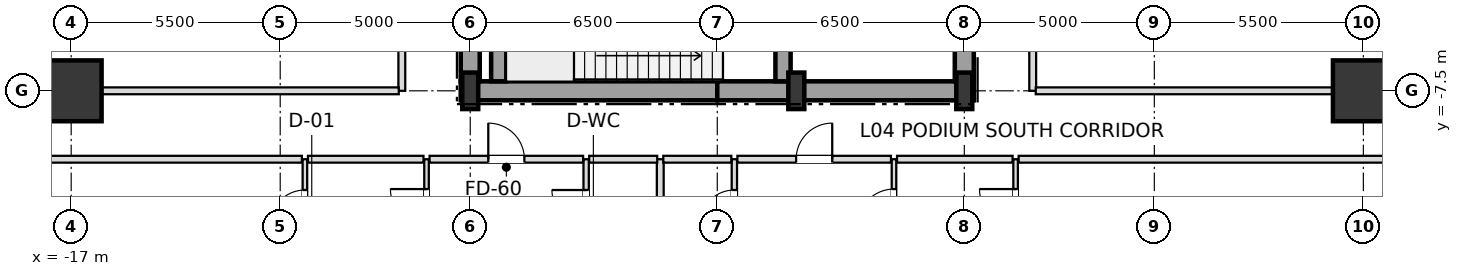
"""IFC4 building model, lengths in metres.
Left out: names, types, materials, properties, quantities, classifications, styles, units other than length and angle.
Written with IfcOpenShell. Run it as: python <this file> out.ifc"""

import sys

from ifc_helpers import new_model, si_unit, direction, frame, frame_2d, origin, origin_2d, place, context, subcontext, project, spatial, rectangle, i_section, extrude, element, fill, save


model = new_model("IFC4")
c1 = context("Model", 3, precision=1e-05, world=origin(), true_north=direction((0.0, 1.0)))
c2 = subcontext(c1, "Body", "Model", "MODEL_VIEW")
j1 = project(units=[si_unit("LENGTHUNIT", "METRE"), si_unit("PLANEANGLEUNIT", "RADIAN")], contexts=[c1])
p1 = place(None, origin())
s1 = spatial("IfcSite", under=j1, at=p1, CompositionType="ELEMENT")
p2 = place(p1, origin())
s2 = spatial("IfcBuilding", under=s1, at=p2, CompositionType="ELEMENT")
p3 = place(p2, frame((0.0, 0.0, 22.2)))
s3 = spatial("IfcBuildingStorey", under=s2, at=p3, CompositionType="ELEMENT", Elevation=22.2)
for number, where, z_axis, x_axis in (
    (1, (-6.5, -7.5, 0.0), (0.0, 0.0, 1.0), (1.0, 0.0, 0.0)),
    (2, (2.08, -7.5, 0.0), (0.0, 0.0, 1.0), (1.0, 0.0, 0.0)),
    (3, (6.5, -7.5, 0.0), (0.0, 0.0, 1.0), (1.0, 0.0, 0.0)),
):
    element("IfcColumn", number, at=place(p3, frame(where, z_axis=z_axis, x_axis=x_axis)), inside=s3, PredefinedType="COLUMN", context=c2, shape_type="SweptSolid", body=[
        extrude(i_section(OverallWidth=0.42, OverallDepth=0.96, WebThickness=0.022, FlangeThickness=0.034, at=origin_2d()), origin(), (0.0, 0.0, 1.0), 5.4),
    ])
for number, where, z_axis, x_axis in (
    (4, (17.0, -7.5, 0.0), (0.0, 0.0, 1.0), (1.0, 0.0, 0.0)),
    (5, (-17.0, -7.5, 0.0), (0.0, 0.0, 1.0), (1.0, 0.0, 0.0)),
):
    element("IfcColumn", number, at=place(p3, frame(where, z_axis=z_axis, x_axis=x_axis)), inside=s3, PredefinedType="USERDEFINED", context=c2, shape_type="SweptSolid", body=[
        extrude(rectangle(XDim=1.6, YDim=1.6, at=origin_2d()), origin(), (0.0, 0.0, 1.0), 5.4),
    ])
for number, where, z_axis, x_axis in (
    (6, (-6.75, -7.5, 0.0), (0.0, 0.0, 1.0), (1.0, 0.0, 0.0)),
    (7, (0.0, -7.5, 0.0), (0.0, 0.0, 1.0), (1.0, 0.0, 0.0)),
):
    element("IfcWall", number, at=place(p3, frame(where, z_axis=z_axis, x_axis=x_axis)), inside=s3, PredefinedType="SHEAR", context=c2, shape_type="SweptSolid", body=[
        extrude(rectangle(XDim=6.75, YDim=0.5, at=frame_2d((3.375, 0.0))), origin(), (0.0, 0.0, 1.0), 5.0),
    ])
p4 = place(p3, frame((-6.5, -7.25, 0.0), z_axis=(0.0, 0.0, 1.0), x_axis=(0.0, 1.0, 0.0)))
e8 = element("IfcWall", 8, at=p4, inside=s3, PredefinedType="SHEAR", context=c2, shape_type="SweptSolid", body=[
    extrude(rectangle(XDim=3.55, YDim=0.5, at=frame_2d((1.775, 0.0))), origin(), (0.0, 0.0, 1.0), 5.0),
])
p5 = place(p3, frame((6.5, -7.25, 0.0), z_axis=(0.0, 0.0, 1.0), x_axis=(0.0, 1.0, 0.0)))
e9 = element("IfcWall", 9, at=p5, inside=s3, PredefinedType="SHEAR", context=c2, shape_type="SweptSolid", body=[
    extrude(rectangle(XDim=5.75, YDim=0.5, at=frame_2d((2.875, 0.0))), origin(), (0.0, 0.0, 1.0), 5.0),
])
p6 = place(p5, frame((0.85, 0.0, 0.0)))
e10 = element("IfcOpeningElement", 10, at=p6, cuts=e9, PredefinedType="OPENING", context=c2, shape_type="SweptSolid", body=[
    extrude(rectangle(XDim=1.05, YDim=2.15, at=frame_2d((0.525, 1.075))), frame((0.0, 0.26, 0.0), z_axis=(0.0, -1.0, 0.0), x_axis=(1.0, 0.0, 0.0)), (0.0, 0.0, 1.0), 0.52),
])
p7 = place(p3, frame((-5.75, -7.25, 0.0), z_axis=(0.0, 0.0, 1.0), x_axis=(0.0, 1.0, 0.0)))
e11 = element("IfcWall", 11, at=p7, inside=s3, PredefinedType="SHEAR", context=c2, shape_type="SweptSolid", body=[
    extrude(rectangle(XDim=2.9, YDim=0.4, at=frame_2d((1.45, 0.0))), origin(), (0.0, 0.0, 1.0), 5.0),
])
p8 = place(p3, frame((1.73, -7.25, 0.0), z_axis=(0.0, 0.0, 1.0), x_axis=(0.0, 1.0, 0.0)))
e12 = element("IfcWall", 12, at=p8, inside=s3, PredefinedType="SHEAR", context=c2, shape_type="SweptSolid", body=[
    extrude(rectangle(XDim=3.3, YDim=0.4, at=frame_2d((1.65, 0.0))), origin(), (0.0, 0.0, 1.0), 5.0),
])
p9 = place(p8, frame((0.9, 0.0, 0.0)))
e13 = element("IfcOpeningElement", 13, at=p9, cuts=e12, PredefinedType="OPENING", context=c2, shape_type="SweptSolid", body=[
    extrude(rectangle(XDim=1.05, YDim=2.15, at=frame_2d((0.525, 1.075))), frame((0.0, 0.21, 0.0), z_axis=(0.0, -1.0, 0.0), x_axis=(1.0, 0.0, 0.0)), (0.0, 0.0, 1.0), 0.42),
])
p10 = place(p3, frame((-10.85, -16.695, 0.0), z_axis=(0.0, 0.0, 1.0), x_axis=(0.0, 1.0, 0.0)))
e14 = element("IfcWall", 14, at=p10, inside=s3, PredefinedType="PARTITIONING", context=c2, shape_type="SweptSolid", body=[
    extrude(rectangle(XDim=7.395, YDim=0.12, at=frame_2d((3.698, 0.0))), origin(), (0.0, 0.0, 1.0), 4.436),
])
p11 = place(p10, frame((5.685, 0.0, 0.0)))
e15 = element("IfcOpeningElement", 15, at=p11, cuts=e14, PredefinedType="OPENING", context=c2, shape_type="SweptSolid", body=[
    extrude(rectangle(XDim=0.9, YDim=2.1, at=frame_2d((0.45, 1.05))), frame((0.0, 0.07, 0.0), z_axis=(0.0, -1.0, 0.0), x_axis=(1.0, 0.0, 0.0)), (0.0, 0.0, 1.0), 0.14),
])
p12 = place(p10, frame((1.985, 0.0, 0.0)))
e16 = element("IfcOpeningElement", 16, at=p12, cuts=e14, PredefinedType="OPENING", context=c2, shape_type="SweptSolid", body=[
    extrude(rectangle(XDim=0.9, YDim=2.1, at=frame_2d((0.45, 1.05))), frame((0.0, 0.07, 0.0), z_axis=(0.0, -1.0, 0.0), x_axis=(1.0, 0.0, 0.0)), (0.0, 0.0, 1.0), 0.14),
])
p13 = place(p3, frame((-8.3, -7.5, 0.0), z_axis=(0.0, 0.0, 1.0), x_axis=(0.0, 1.0, 0.0)))
e17 = element("IfcWall", 17, at=p13, inside=s3, PredefinedType="PARTITIONING", context=c2, shape_type="SweptSolid", body=[
    extrude(rectangle(XDim=15.0, YDim=0.18, at=frame_2d((7.5, 0.0))), origin(), (0.0, 0.0, 1.0), 5.0),
])
p14 = place(p13, frame((7.025, 0.0, 0.0)))
e18 = element("IfcOpeningElement", 18, at=p14, cuts=e17, PredefinedType="OPENING", context=c2, shape_type="SweptSolid", body=[
    extrude(rectangle(XDim=0.95, YDim=2.15, at=frame_2d((0.475, 1.075))), frame((0.0, 0.1, 0.0), z_axis=(0.0, -1.0, 0.0), x_axis=(1.0, 0.0, 0.0)), (0.0, 0.0, 1.0), 0.2),
])
p15 = place(p3, frame((-7.65, -11.82, 0.0), z_axis=(0.0, 0.0, 1.0), x_axis=(0.0, 1.0, 0.0)))
e19 = element("IfcWall", 19, at=p15, inside=s3, PredefinedType="PARTITIONING", context=c2, shape_type="SweptSolid", body=[
    extrude(rectangle(XDim=2.52, YDim=0.12, at=frame_2d((1.26, 0.0))), origin(), (0.0, 0.0, 1.0), 5.0),
])
p16 = place(p15, frame((0.785, 0.0, 0.0)))
e20 = element("IfcOpeningElement", 20, at=p16, cuts=e19, PredefinedType="OPENING", context=c2, shape_type="SweptSolid", body=[
    extrude(rectangle(XDim=0.95, YDim=2.1, at=frame_2d((0.475, 1.05))), frame((0.0, 0.07, 0.0), z_axis=(0.0, -1.0, 0.0), x_axis=(1.0, 0.0, 0.0)), (0.0, 0.0, 1.0), 0.14),
])
p17 = place(p3, frame((-3.45, -11.82, 0.0), z_axis=(0.0, 0.0, 1.0), x_axis=(0.0, 1.0, 0.0)))
e21 = element("IfcWall", 21, at=p17, inside=s3, PredefinedType="PARTITIONING", context=c2, shape_type="SweptSolid", body=[
    extrude(rectangle(XDim=2.52, YDim=0.14, at=frame_2d((1.26, 0.0))), origin(), (0.0, 0.0, 1.0), 5.0),
])
p18 = place(p17, frame((0.81, 0.0, 0.0)))
e22 = element("IfcOpeningElement", 22, at=p18, cuts=e21, PredefinedType="OPENING", context=c2, shape_type="SweptSolid", body=[
    extrude(rectangle(XDim=0.9, YDim=2.1, at=frame_2d((0.45, 1.05))), frame((0.0, 0.08, 0.0), z_axis=(0.0, -1.0, 0.0), x_axis=(1.0, 0.0, 0.0)), (0.0, 0.0, 1.0), 0.16),
])
p19 = place(p3, frame((-1.5, -16.755, 0.0), z_axis=(0.0, 0.0, 1.0), x_axis=(0.0, 1.0, 0.0)))
e23 = element("IfcWall", 23, at=p19, inside=s3, PredefinedType="PARTITIONING", context=c2, shape_type="SweptSolid", body=[
    extrude(rectangle(XDim=7.455, YDim=0.18, at=frame_2d((3.728, 0.0))), origin(), (0.0, 0.0, 1.0), 4.568),
])
p20 = place(p3, frame((0.45, -11.82, 0.0), z_axis=(0.0, 0.0, 1.0), x_axis=(0.0, 1.0, 0.0)))
e24 = element("IfcWall", 24, at=p20, inside=s3, PredefinedType="PARTITIONING", context=c2, shape_type="SweptSolid", body=[
    extrude(rectangle(XDim=2.52, YDim=0.14, at=frame_2d((1.26, 0.0))), origin(), (0.0, 0.0, 1.0), 5.0),
])
p21 = place(p20, frame((0.81, 0.0, 0.0)))
e25 = element("IfcOpeningElement", 25, at=p21, cuts=e24, PredefinedType="OPENING", context=c2, shape_type="SweptSolid", body=[
    extrude(rectangle(XDim=0.9, YDim=2.1, at=frame_2d((0.45, 1.05))), frame((0.0, 0.08, 0.0), z_axis=(0.0, -1.0, 0.0), x_axis=(1.0, 0.0, 0.0)), (0.0, 0.0, 1.0), 0.16),
])
p22 = place(p3, frame((4.65, -11.82, 0.0), z_axis=(0.0, 0.0, 1.0), x_axis=(0.0, 1.0, 0.0)))
e26 = element("IfcWall", 26, at=p22, inside=s3, PredefinedType="PARTITIONING", context=c2, shape_type="SweptSolid", body=[
    extrude(rectangle(XDim=2.52, YDim=0.12, at=frame_2d((1.26, 0.0))), origin(), (0.0, 0.0, 1.0), 5.0),
])
p23 = place(p22, frame((0.785, 0.0, 0.0)))
e27 = element("IfcOpeningElement", 27, at=p23, cuts=e26, PredefinedType="OPENING", context=c2, shape_type="SweptSolid", body=[
    extrude(rectangle(XDim=0.95, YDim=2.1, at=frame_2d((0.475, 1.05))), frame((0.0, 0.07, 0.0), z_axis=(0.0, -1.0, 0.0), x_axis=(1.0, 0.0, 0.0)), (0.0, 0.0, 1.0), 0.14),
])
p24 = place(p3, frame((7.85, -16.695, 0.0), z_axis=(0.0, 0.0, 1.0), x_axis=(0.0, 1.0, 0.0)))
e28 = element("IfcWall", 28, at=p24, inside=s3, PredefinedType="PARTITIONING", context=c2, shape_type="SweptSolid", body=[
    extrude(rectangle(XDim=7.395, YDim=0.12, at=frame_2d((3.698, 0.0))), origin(), (0.0, 0.0, 1.0), 4.436),
])
p25 = place(p24, frame((5.66, 0.0, 0.0)))
e29 = element("IfcOpeningElement", 29, at=p25, cuts=e28, PredefinedType="OPENING", context=c2, shape_type="SweptSolid", body=[
    extrude(rectangle(XDim=0.95, YDim=2.1, at=frame_2d((0.475, 1.05))), frame((0.0, 0.07, 0.0), z_axis=(0.0, -1.0, 0.0), x_axis=(1.0, 0.0, 0.0)), (0.0, 0.0, 1.0), 0.14),
])
p26 = place(p24, frame((1.985, 0.0, 0.0)))
e30 = element("IfcOpeningElement", 30, at=p26, cuts=e28, PredefinedType="OPENING", context=c2, shape_type="SweptSolid", body=[
    extrude(rectangle(XDim=0.9, YDim=2.1, at=frame_2d((0.45, 1.05))), frame((0.0, 0.07, 0.0), z_axis=(0.0, -1.0, 0.0), x_axis=(1.0, 0.0, 0.0)), (0.0, 0.0, 1.0), 0.14),
])
p27 = place(p3, frame((8.3, -7.5, 0.0), z_axis=(0.0, 0.0, 1.0), x_axis=(0.0, 1.0, 0.0)))
e31 = element("IfcWall", 31, at=p27, inside=s3, PredefinedType="PARTITIONING", context=c2, shape_type="SweptSolid", body=[
    extrude(rectangle(XDim=15.0, YDim=0.18, at=frame_2d((7.5, 0.0))), origin(), (0.0, 0.0, 1.0), 5.0),
])
p28 = place(p27, frame((5.025, 0.0, 0.0)))
e32 = element("IfcOpeningElement", 32, at=p28, cuts=e31, PredefinedType="OPENING", context=c2, shape_type="SweptSolid", body=[
    extrude(rectangle(XDim=0.95, YDim=2.15, at=frame_2d((0.475, 1.075))), frame((0.0, 0.1, 0.0), z_axis=(0.0, -1.0, 0.0), x_axis=(1.0, 0.0, 0.0)), (0.0, 0.0, 1.0), 0.2),
])
p29 = place(p27, frame((12.225, 0.0, 0.0)))
e33 = element("IfcOpeningElement", 33, at=p29, cuts=e31, PredefinedType="OPENING", context=c2, shape_type="SweptSolid", body=[
    extrude(rectangle(XDim=0.95, YDim=2.15, at=frame_2d((0.475, 1.075))), frame((0.0, 0.1, 0.0), z_axis=(0.0, -1.0, 0.0), x_axis=(1.0, 0.0, 0.0)), (0.0, 0.0, 1.0), 0.2),
])
p30 = place(p3, frame((-22.695, -9.3, 0.0), z_axis=(0.0, 0.0, 1.0), x_axis=(1.0, 0.0, 0.0)))
e34 = element("IfcWall", 34, at=p30, inside=s3, PredefinedType="PARTITIONING", context=c2, shape_type="SweptSolid", body=[
    extrude(rectangle(XDim=11.765, YDim=0.18, at=frame_2d((5.883, 0.0))), origin(), (0.0, 0.0, 1.0), 4.356),
])
p31 = place(p3, frame((-10.77, -9.3, 0.0), z_axis=(0.0, 0.0, 1.0), x_axis=(1.0, 0.0, 0.0)))
e35 = element("IfcWall", 35, at=p31, inside=s3, PredefinedType="PARTITIONING", context=c2, shape_type="SweptSolid", body=[
    extrude(rectangle(XDim=3.04, YDim=0.18, at=frame_2d((1.52, 0.0))), origin(), (0.0, 0.0, 1.0), 5.0),
])
p32 = place(p3, frame((-7.57, -9.3, 0.0), z_axis=(0.0, 0.0, 1.0), x_axis=(1.0, 0.0, 0.0)))
e36 = element("IfcWall", 36, at=p32, inside=s3, PredefinedType="PARTITIONING", context=c2, shape_type="SweptSolid", body=[
    extrude(rectangle(XDim=4.04, YDim=0.18, at=frame_2d((2.02, 0.0))), origin(), (0.0, 0.0, 1.0), 4.436),
])
p33 = place(p32, frame((1.545, 0.0, 0.0)))
e37 = element("IfcOpeningElement", 37, at=p33, cuts=e36, PredefinedType="OPENING", context=c2, shape_type="SweptSolid", body=[
    extrude(rectangle(XDim=0.95, YDim=2.15, at=frame_2d((0.475, 1.075))), frame((0.0, 0.1, 0.0), z_axis=(0.0, -1.0, 0.0), x_axis=(1.0, 0.0, 0.0)), (0.0, 0.0, 1.0), 0.2),
])
for number, where, z_axis, x_axis in (
    (38, (-3.37, -9.3, 0.0), (0.0, 0.0, 1.0), (1.0, 0.0, 0.0)),
    (39, (-1.42, -9.3, 0.0), (0.0, 0.0, 1.0), (1.0, 0.0, 0.0)),
):
    element("IfcWall", number, at=place(p3, frame(where, z_axis=z_axis, x_axis=x_axis)), inside=s3, PredefinedType="PARTITIONING", context=c2, shape_type="SweptSolid", body=[
        extrude(rectangle(XDim=1.79, YDim=0.18, at=frame_2d((0.895, 0.0))), origin(), (0.0, 0.0, 1.0), 5.0),
    ])
p34 = place(p3, frame((0.53, -9.3, 0.0), z_axis=(0.0, 0.0, 1.0), x_axis=(1.0, 0.0, 0.0)))
e40 = element("IfcWall", 40, at=p34, inside=s3, PredefinedType="PARTITIONING", context=c2, shape_type="SweptSolid", body=[
    extrude(rectangle(XDim=4.04, YDim=0.18, at=frame_2d((2.02, 0.0))), origin(), (0.0, 0.0, 1.0), 5.0),
])
p35 = place(p34, frame((1.545, 0.0, 0.0)))
e41 = element("IfcOpeningElement", 41, at=p35, cuts=e40, PredefinedType="OPENING", context=c2, shape_type="SweptSolid", body=[
    extrude(rectangle(XDim=0.95, YDim=2.15, at=frame_2d((0.475, 1.075))), frame((0.0, 0.1, 0.0), z_axis=(0.0, -1.0, 0.0), x_axis=(1.0, 0.0, 0.0)), (0.0, 0.0, 1.0), 0.2),
])
p36 = place(p3, frame((4.73, -9.3, 0.0), z_axis=(0.0, 0.0, 1.0), x_axis=(1.0, 0.0, 0.0)))
e42 = element("IfcWall", 42, at=p36, inside=s3, PredefinedType="PARTITIONING", context=c2, shape_type="SweptSolid", body=[
    extrude(rectangle(XDim=3.04, YDim=0.18, at=frame_2d((1.52, 0.0))), origin(), (0.0, 0.0, 1.0), 4.436),
])
p37 = place(p3, frame((7.93, -9.3, 0.0), z_axis=(0.0, 0.0, 1.0), x_axis=(1.0, 0.0, 0.0)))
e43 = element("IfcWall", 43, at=p37, inside=s3, PredefinedType="PARTITIONING", context=c2, shape_type="SweptSolid", body=[
    extrude(rectangle(XDim=14.765, YDim=0.18, at=frame_2d((7.383, 0.0))), origin(), (0.0, 0.0, 1.0), 4.356),
])
for number, where, z_axis, x_axis in (
    (44, (-22.695, -7.5, 0.0), (0.0, 0.0, 1.0), (1.0, 0.0, 0.0)),
    (45, (8.38, -7.5, 0.0), (0.0, 0.0, 1.0), (1.0, 0.0, 0.0)),
):
    element("IfcWall", number, at=place(p3, frame(where, z_axis=z_axis, x_axis=x_axis)), inside=s3, PredefinedType="PARTITIONING", context=c2, shape_type="SweptSolid", body=[
        extrude(rectangle(XDim=14.315, YDim=0.18, at=frame_2d((7.158, 0.0))), origin(), (0.0, 0.0, 1.0), 4.356),
    ])
p38 = place(p18, origin())
e46 = element("IfcDoor", 46, at=p38, inside=s3, OperationType="SINGLE_SWING_RIGHT", PredefinedType="DOOR", context=c2, shape_type="SweptSolid", body=[
    extrude(rectangle(XDim=0.9, YDim=2.1, at=frame_2d((0.45, 1.05))), frame((0.0, 0.025, 0.0), z_axis=(0.0, -1.0, 0.0), x_axis=(1.0, 0.0, 0.0)), (0.0, 0.0, 1.0), 0.05),
])
fill(e22, e46)
p39 = place(p33, origin())
e47 = element("IfcDoor", 47, at=p39, inside=s3, OperationType="SINGLE_SWING_LEFT", PredefinedType="DOOR", context=c2, shape_type="SweptSolid", body=[
    extrude(rectangle(XDim=0.95, YDim=2.15, at=frame_2d((0.475, 1.075))), frame((0.0, 0.025, 0.0), z_axis=(0.0, -1.0, 0.0), x_axis=(1.0, 0.0, 0.0)), (0.0, 0.0, 1.0), 0.05),
])
fill(e37, e47)
p40 = place(p16, origin())
e48 = element("IfcDoor", 48, at=p40, inside=s3, OperationType="SINGLE_SWING_RIGHT", PredefinedType="DOOR", context=c2, shape_type="SweptSolid", body=[
    extrude(rectangle(XDim=0.95, YDim=2.1, at=frame_2d((0.475, 1.05))), frame((0.0, 0.025, 0.0), z_axis=(0.0, -1.0, 0.0), x_axis=(1.0, 0.0, 0.0)), (0.0, 0.0, 1.0), 0.05),
])
fill(e20, e48)
p41 = place(p11, origin())
e49 = element("IfcDoor", 49, at=p41, inside=s3, OperationType="SINGLE_SWING_LEFT", PredefinedType="DOOR", context=c2, shape_type="SweptSolid", body=[
    extrude(rectangle(XDim=0.9, YDim=2.1, at=frame_2d((0.45, 1.05))), frame((0.0, 0.025, 0.0), z_axis=(0.0, -1.0, 0.0), x_axis=(1.0, 0.0, 0.0)), (0.0, 0.0, 1.0), 0.05),
])
fill(e15, e49)
p42 = place(p21, origin())
e50 = element("IfcDoor", 50, at=p42, inside=s3, OperationType="SINGLE_SWING_LEFT", PredefinedType="DOOR", context=c2, shape_type="SweptSolid", body=[
    extrude(rectangle(XDim=0.9, YDim=2.1, at=frame_2d((0.45, 1.05))), frame((0.0, 0.025, 0.0), z_axis=(0.0, -1.0, 0.0), x_axis=(1.0, 0.0, 0.0)), (0.0, 0.0, 1.0), 0.05),
])
fill(e25, e50)
p43 = place(p35, origin())
e51 = element("IfcDoor", 51, at=p43, inside=s3, OperationType="SINGLE_SWING_RIGHT", PredefinedType="DOOR", context=c2, shape_type="SweptSolid", body=[
    extrude(rectangle(XDim=0.95, YDim=2.15, at=frame_2d((0.475, 1.075))), frame((0.0, 0.025, 0.0), z_axis=(0.0, -1.0, 0.0), x_axis=(1.0, 0.0, 0.0)), (0.0, 0.0, 1.0), 0.05),
])
fill(e41, e51)
p44 = place(p23, origin())
e52 = element("IfcDoor", 52, at=p44, inside=s3, OperationType="SINGLE_SWING_LEFT", PredefinedType="DOOR", context=c2, shape_type="SweptSolid", body=[
    extrude(rectangle(XDim=0.95, YDim=2.1, at=frame_2d((0.475, 1.05))), frame((0.0, 0.025, 0.0), z_axis=(0.0, -1.0, 0.0), x_axis=(1.0, 0.0, 0.0)), (0.0, 0.0, 1.0), 0.05),
])
fill(e27, e52)
p45 = place(p25, origin())
e53 = element("IfcDoor", 53, at=p45, inside=s3, OperationType="SINGLE_SWING_RIGHT", PredefinedType="DOOR", context=c2, shape_type="SweptSolid", body=[
    extrude(rectangle(XDim=0.95, YDim=2.1, at=frame_2d((0.475, 1.05))), frame((0.0, 0.025, 0.0), z_axis=(0.0, -1.0, 0.0), x_axis=(1.0, 0.0, 0.0)), (0.0, 0.0, 1.0), 0.05),
])
fill(e29, e53)
save(model, sys.argv[1])
